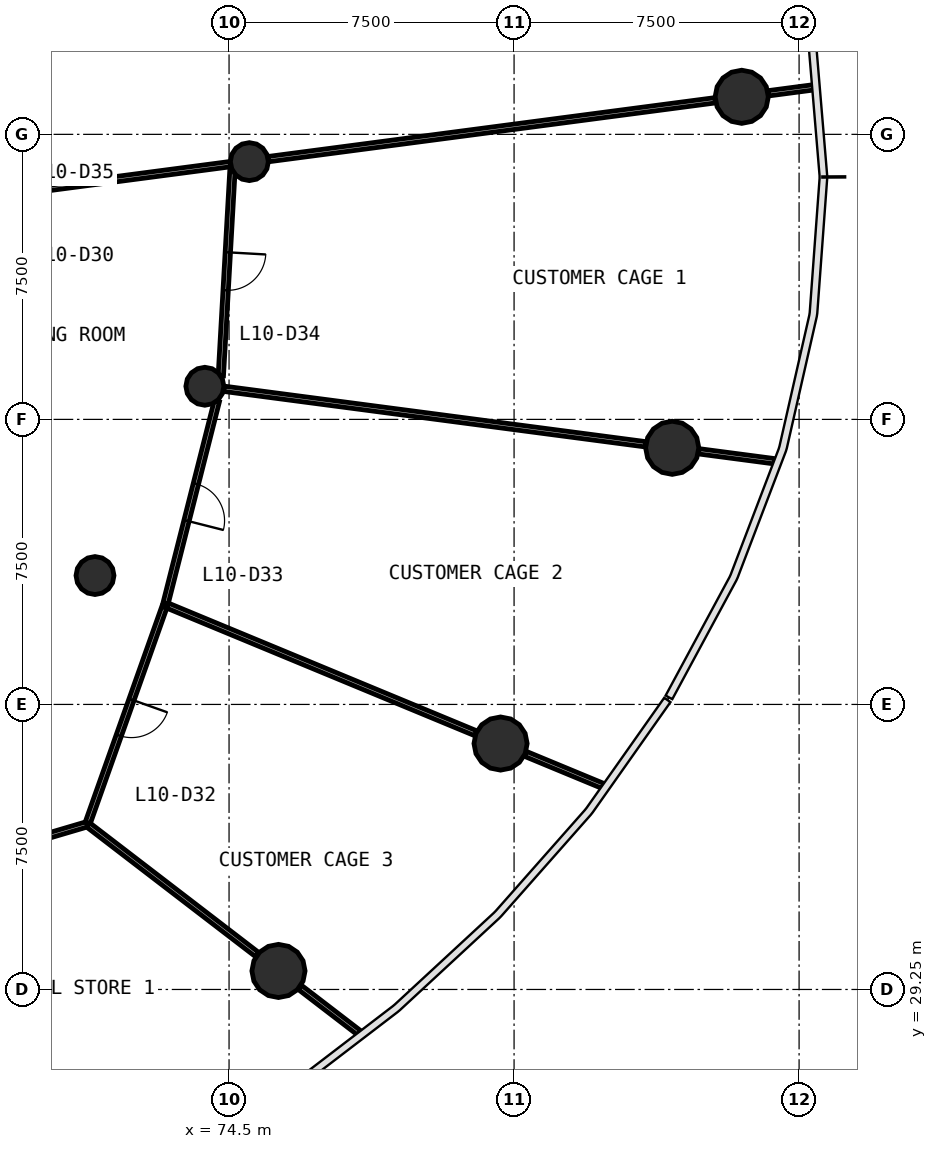
"""IFC4 building model, lengths in metres.
Left out: names, types, materials, properties, quantities, classifications, styles, units other than length and angle.
Written with IfcOpenShell. Run it as: python <this file> out.ifc"""

import sys

from ifc_helpers import new_model, si_unit, direction, frame, frame_2d, origin, origin_2d, place, context, subcontext, project, spatial, rectangle, circle, extrude, source, transform, mapped, element, fill, save


model = new_model("IFC4")
c1 = context("Model", 3, precision=1e-05, world=origin(), true_north=direction((0.0, 1.0)))
c2 = subcontext(c1, "Body", "Model", "MODEL_VIEW")
j1 = project(units=[si_unit("LENGTHUNIT", "METRE"), si_unit("PLANEANGLEUNIT", "RADIAN")], contexts=[c1])
p1 = place(None, origin())
s1 = spatial("IfcSite", under=j1, at=p1, CompositionType="ELEMENT")
p2 = place(p1, origin())
s2 = spatial("IfcBuilding", under=s1, at=p2, CompositionType="ELEMENT")
p3 = place(p2, frame((0.0, 0.0, 44.6)))
s3 = spatial("IfcBuildingStorey", under=s2, at=p3, CompositionType="ELEMENT", Elevation=44.6)
m1 = source(origin(), c2, "Body", "SweptSolid", [
    extrude(circle(Radius=0.7, at=origin_2d()), origin(), (0.0, 0.0, 1.0), 4.4),
])
for number, where, z_axis, x_axis in (
    (1, (87.99, 52.738, 0.0), (0.0, 0.0, 1.0), (1.0, 0.0, 0.0)),
    (2, (75.801, 29.737, 0.0), (0.0, 0.0, 1.0), (1.0, 0.0, 0.0)),
    (3, (81.645, 35.721, 0.0), (0.0, 0.0, 1.0), (1.0, 0.0, 0.0)),
    (4, (86.161, 43.503, 0.0), (0.0, 0.0, 1.0), (1.0, 0.0, 0.0)),
):
    element("IfcColumn", number, at=place(p3, frame(where, z_axis=z_axis, x_axis=x_axis)), inside=s3, PredefinedType="COLUMN", context=c2, shape_type="MappedRepresentation", body=[
        mapped(m1, transform((0.0, 0.0, 0.0), scale=1.0)),
    ])
m2 = source(origin(), c2, "Body", "SweptSolid", [
    extrude(circle(Radius=0.5, at=origin_2d()), origin(), (0.0, 0.0, 1.0), 4.4),
])
for number, where, z_axis, x_axis in (
    (5, (75.034, 51.032, 0.0), (0.0, 0.0, 1.0), (1.0, 0.0, 0.0)),
    (6, (70.972, 40.141, 0.0), (0.0, 0.0, 1.0), (1.0, 0.0, 0.0)),
    (7, (73.863, 45.122, 0.0), (0.0, 0.0, 1.0), (1.0, 0.0, 0.0)),
):
    element("IfcColumn", number, at=place(p3, frame(where, z_axis=z_axis, x_axis=x_axis)), inside=s3, PredefinedType="COLUMN", context=c2, shape_type="MappedRepresentation", body=[
        mapped(m2, transform((0.0, 0.0, 0.0), scale=1.0)),
    ])
p4 = place(p3, frame((75.534, 51.098, 0.0), z_axis=(0.0, 0.0, 1.0), x_axis=(0.991446586451, 0.130513088287, 0.0)))
e8 = element("IfcWall", 8, at=p4, inside=s3, PredefinedType="PARTITIONING", context=c2, shape_type="SweptSolid", body=[
    extrude(rectangle(XDim=11.86, YDim=0.14, at=frame_2d((5.93, 0.0))), origin(), (0.0, 0.0, 1.0), 3.05),
])
p5 = place(p3, frame((74.363, 45.056, 0.0), z_axis=(0.0, 0.0, 1.0), x_axis=(0.991443306772, -0.130538000051, 0.0)))
e9 = element("IfcWall", 9, at=p5, inside=s3, PredefinedType="PARTITIONING", context=c2, shape_type="SweptSolid", body=[
    extrude(rectangle(XDim=11.195, YDim=0.14, at=frame_2d((5.598, 0.0))), origin(), (0.0, 0.0, 1.0), 3.05),
])
p6 = place(p3, frame((72.821, 39.375, 0.0), z_axis=(0.0, 0.0, 1.0), x_axis=(0.923875203153, -0.382693884193, 0.0)))
e10 = element("IfcWall", 10, at=p6, inside=s3, PredefinedType="PARTITIONING", context=c2, shape_type="SweptSolid", body=[
    extrude(rectangle(XDim=8.845, YDim=0.14, at=frame_2d((4.423, 0.0))), origin(), (0.0, 0.0, 1.0), 3.05),
])
p7 = place(p3, frame((67.49, 50.039, 0.0), z_axis=(0.0, 0.0, 1.0), x_axis=(0.99144622305, 0.130515848849, 0.0)))
e11 = element("IfcWall", 11, at=p7, inside=s3, PredefinedType="PARTITIONING", context=c2, shape_type="SweptSolid", body=[
    extrude(rectangle(XDim=7.104, YDim=0.14, at=frame_2d((3.552, 0.0))), origin(), (0.0, 0.0, 1.0), 3.05),
])
p8 = place(p3, frame((70.769, 33.598, 0.0), z_axis=(0.0, 0.0, 1.0), x_axis=(-0.959164410747, -0.282849134974, 0.0)))
e12 = element("IfcWall", 12, at=p8, inside=s3, PredefinedType="PARTITIONING", context=c2, shape_type="SweptSolid", body=[
    extrude(rectangle(XDim=6.562, YDim=0.14, at=frame_2d((3.281, 0.0))), origin(), (0.0, 0.0, 1.0), 3.05),
])
p9 = place(p8, frame((2.712, 0.0, 0.0)))
e13 = element("IfcOpeningElement", 13, at=p9, cuts=e12, PredefinedType="OPENING", context=c2, shape_type="SweptSolid", body=[
    extrude(rectangle(XDim=1.0, YDim=2.1, at=frame_2d((0.5, 1.05))), frame((0.0, 0.08, 0.0), z_axis=(0.0, -1.0, 0.0), x_axis=(1.0, 0.0, 0.0)), (0.0, 0.0, 1.0), 0.16),
])
p10 = place(p3, frame((72.798, 39.309, 0.0), z_axis=(0.0, 0.0, 1.0), x_axis=(-0.334820387554, -0.942281968456, 0.0)))
e14 = element("IfcWall", 14, at=p10, inside=s3, PredefinedType="PARTITIONING", context=c2, shape_type="SweptSolid", body=[
    extrude(rectangle(XDim=6.031, YDim=0.14, at=frame_2d((3.016, 0.0))), origin(), (0.0, 0.0, 1.0), 3.05),
])
p11 = place(p10, frame((2.581, 0.0, 0.0)))
e15 = element("IfcOpeningElement", 15, at=p11, cuts=e14, PredefinedType="OPENING", context=c2, shape_type="SweptSolid", body=[
    extrude(rectangle(XDim=1.0, YDim=2.1, at=frame_2d((0.5, 1.05))), frame((0.0, 0.08, 0.0), z_axis=(0.0, -1.0, 0.0), x_axis=(1.0, 0.0, 0.0)), (0.0, 0.0, 1.0), 0.16),
])
p12 = place(p3, frame((70.793, 33.58, 0.0), z_axis=(0.0, 0.0, 1.0), x_axis=(0.793369467151, -0.6087404115, 0.0)))
e16 = element("IfcWall", 16, at=p12, inside=s3, PredefinedType="PARTITIONING", context=c2, shape_type="SweptSolid", body=[
    extrude(rectangle(XDim=5.608, YDim=0.14, at=frame_2d((2.804, 0.0))), origin(), (0.0, 0.0, 1.0), 3.05),
])
p13 = place(p3, frame((74.178, 44.727, 0.0), z_axis=(0.0, 0.0, 1.0), x_axis=(-0.245735490717, -0.969336922129, 0.0)))
e17 = element("IfcWall", 17, at=p13, inside=s3, PredefinedType="PARTITIONING", context=c2, shape_type="SweptSolid", body=[
    extrude(rectangle(XDim=5.491, YDim=0.14, at=frame_2d((2.746, 0.0))), origin(), (0.0, 0.0, 1.0), 3.05),
])
p14 = place(p13, frame((2.241, 0.0, 0.0)))
e18 = element("IfcOpeningElement", 18, at=p14, cuts=e17, PredefinedType="OPENING", context=c2, shape_type="SweptSolid", body=[
    extrude(rectangle(XDim=1.0, YDim=2.1, at=frame_2d((0.5, 1.05))), frame((0.0, 0.08, 0.0), z_axis=(0.0, -1.0, 0.0), x_axis=(1.0, 0.0, 0.0)), (0.0, 0.0, 1.0), 0.16),
])
p15 = place(p3, frame((74.589, 50.793, 0.0), z_axis=(0.0, 0.0, 1.0), x_axis=(-0.056551571082, -0.998399679391, 0.0)))
e19 = element("IfcWall", 19, at=p15, inside=s3, PredefinedType="PARTITIONING", context=c2, shape_type="SweptSolid", body=[
    extrude(rectangle(XDim=5.401, YDim=0.14, at=frame_2d((2.7, 0.0))), origin(), (0.0, 0.0, 1.0), 3.05),
])
p16 = place(p15, frame((2.151, 0.0, 0.0)))
e20 = element("IfcOpeningElement", 20, at=p16, cuts=e19, PredefinedType="OPENING", context=c2, shape_type="SweptSolid", body=[
    extrude(rectangle(XDim=1.0, YDim=2.1, at=frame_2d((0.5, 1.05))), frame((0.0, 0.08, 0.0), z_axis=(0.0, -1.0, 0.0), x_axis=(1.0, 0.0, 0.0)), (0.0, 0.0, 1.0), 0.16),
])
p17 = place(p3, frame((82.296, 35.451, 0.0), z_axis=(0.0, 0.0, 1.0), x_axis=(0.923899948789, -0.382634139392, 0.0)))
e21 = element("IfcWall", 21, at=p17, inside=s3, PredefinedType="PARTITIONING", context=c2, shape_type="SweptSolid", body=[
    extrude(rectangle(XDim=2.215, YDim=0.14, at=frame_2d((1.107, 0.0))), origin(), (0.0, 0.0, 1.0), 3.05),
])
p18 = place(p3, frame((86.859, 43.411, 0.0), z_axis=(0.0, 0.0, 1.0), x_axis=(0.991443960057, -0.130533038219, 0.0)))
e22 = element("IfcWall", 22, at=p18, inside=s3, PredefinedType="PARTITIONING", context=c2, shape_type="SweptSolid", body=[
    extrude(rectangle(XDim=2.01, YDim=0.14, at=frame_2d((1.005, 0.0))), origin(), (0.0, 0.0, 1.0), 3.05),
])
p19 = place(p3, frame((76.359, 29.309, 0.0), z_axis=(0.0, 0.0, 1.0), x_axis=(0.793312100237, -0.608815170325, 0.0)))
e23 = element("IfcWall", 23, at=p19, inside=s3, PredefinedType="PARTITIONING", context=c2, shape_type="SweptSolid", body=[
    extrude(rectangle(XDim=1.977, YDim=0.14, at=frame_2d((0.989, 0.0))), origin(), (0.0, 0.0, 1.0), 3.05),
])
p20 = place(p3, frame((88.689, 52.83, 0.0), z_axis=(0.0, 0.0, 1.0), x_axis=(0.991424298155, 0.130682290411, 0.0)))
e24 = element("IfcWall", 24, at=p20, inside=s3, PredefinedType="PARTITIONING", context=c2, shape_type="SweptSolid", body=[
    extrude(rectangle(XDim=1.22, YDim=0.14, at=frame_2d((0.61, 0.0))), origin(), (0.0, 0.0, 1.0), 3.05),
])
m3 = source(origin(), c2, "Body", "SweptSolid", [
    extrude(rectangle(XDim=1.0, YDim=2.1, at=frame_2d((0.5, 1.05))), frame((0.0, 0.025, 0.0), z_axis=(0.0, -1.0, 0.0), x_axis=(1.0, 0.0, 0.0)), (0.0, 0.0, 1.0), 0.05),
])
p21 = place(p11, origin())
e25 = element("IfcDoor", 25, at=p21, inside=s3, OperationType="SINGLE_SWING_LEFT", PredefinedType="DOOR", context=c2, shape_type="MappedRepresentation", body=[
    mapped(m3, transform((0.0, 0.0, 0.0), scale=1.0)),
])
fill(e15, e25)
p22 = place(p14, origin())
e26 = element("IfcDoor", 26, at=p22, inside=s3, OperationType="SINGLE_SWING_RIGHT", PredefinedType="DOOR", context=c2, shape_type="MappedRepresentation", body=[
    mapped(m3, transform((0.0, 0.0, 0.0), scale=1.0)),
])
fill(e18, e26)
p23 = place(p16, origin())
e27 = element("IfcDoor", 27, at=p23, inside=s3, OperationType="SINGLE_SWING_LEFT", PredefinedType="DOOR", context=c2, shape_type="MappedRepresentation", body=[
    mapped(m3, transform((0.0, 0.0, 0.0), scale=1.0)),
])
fill(e20, e27)
save(model, sys.argv[1])
